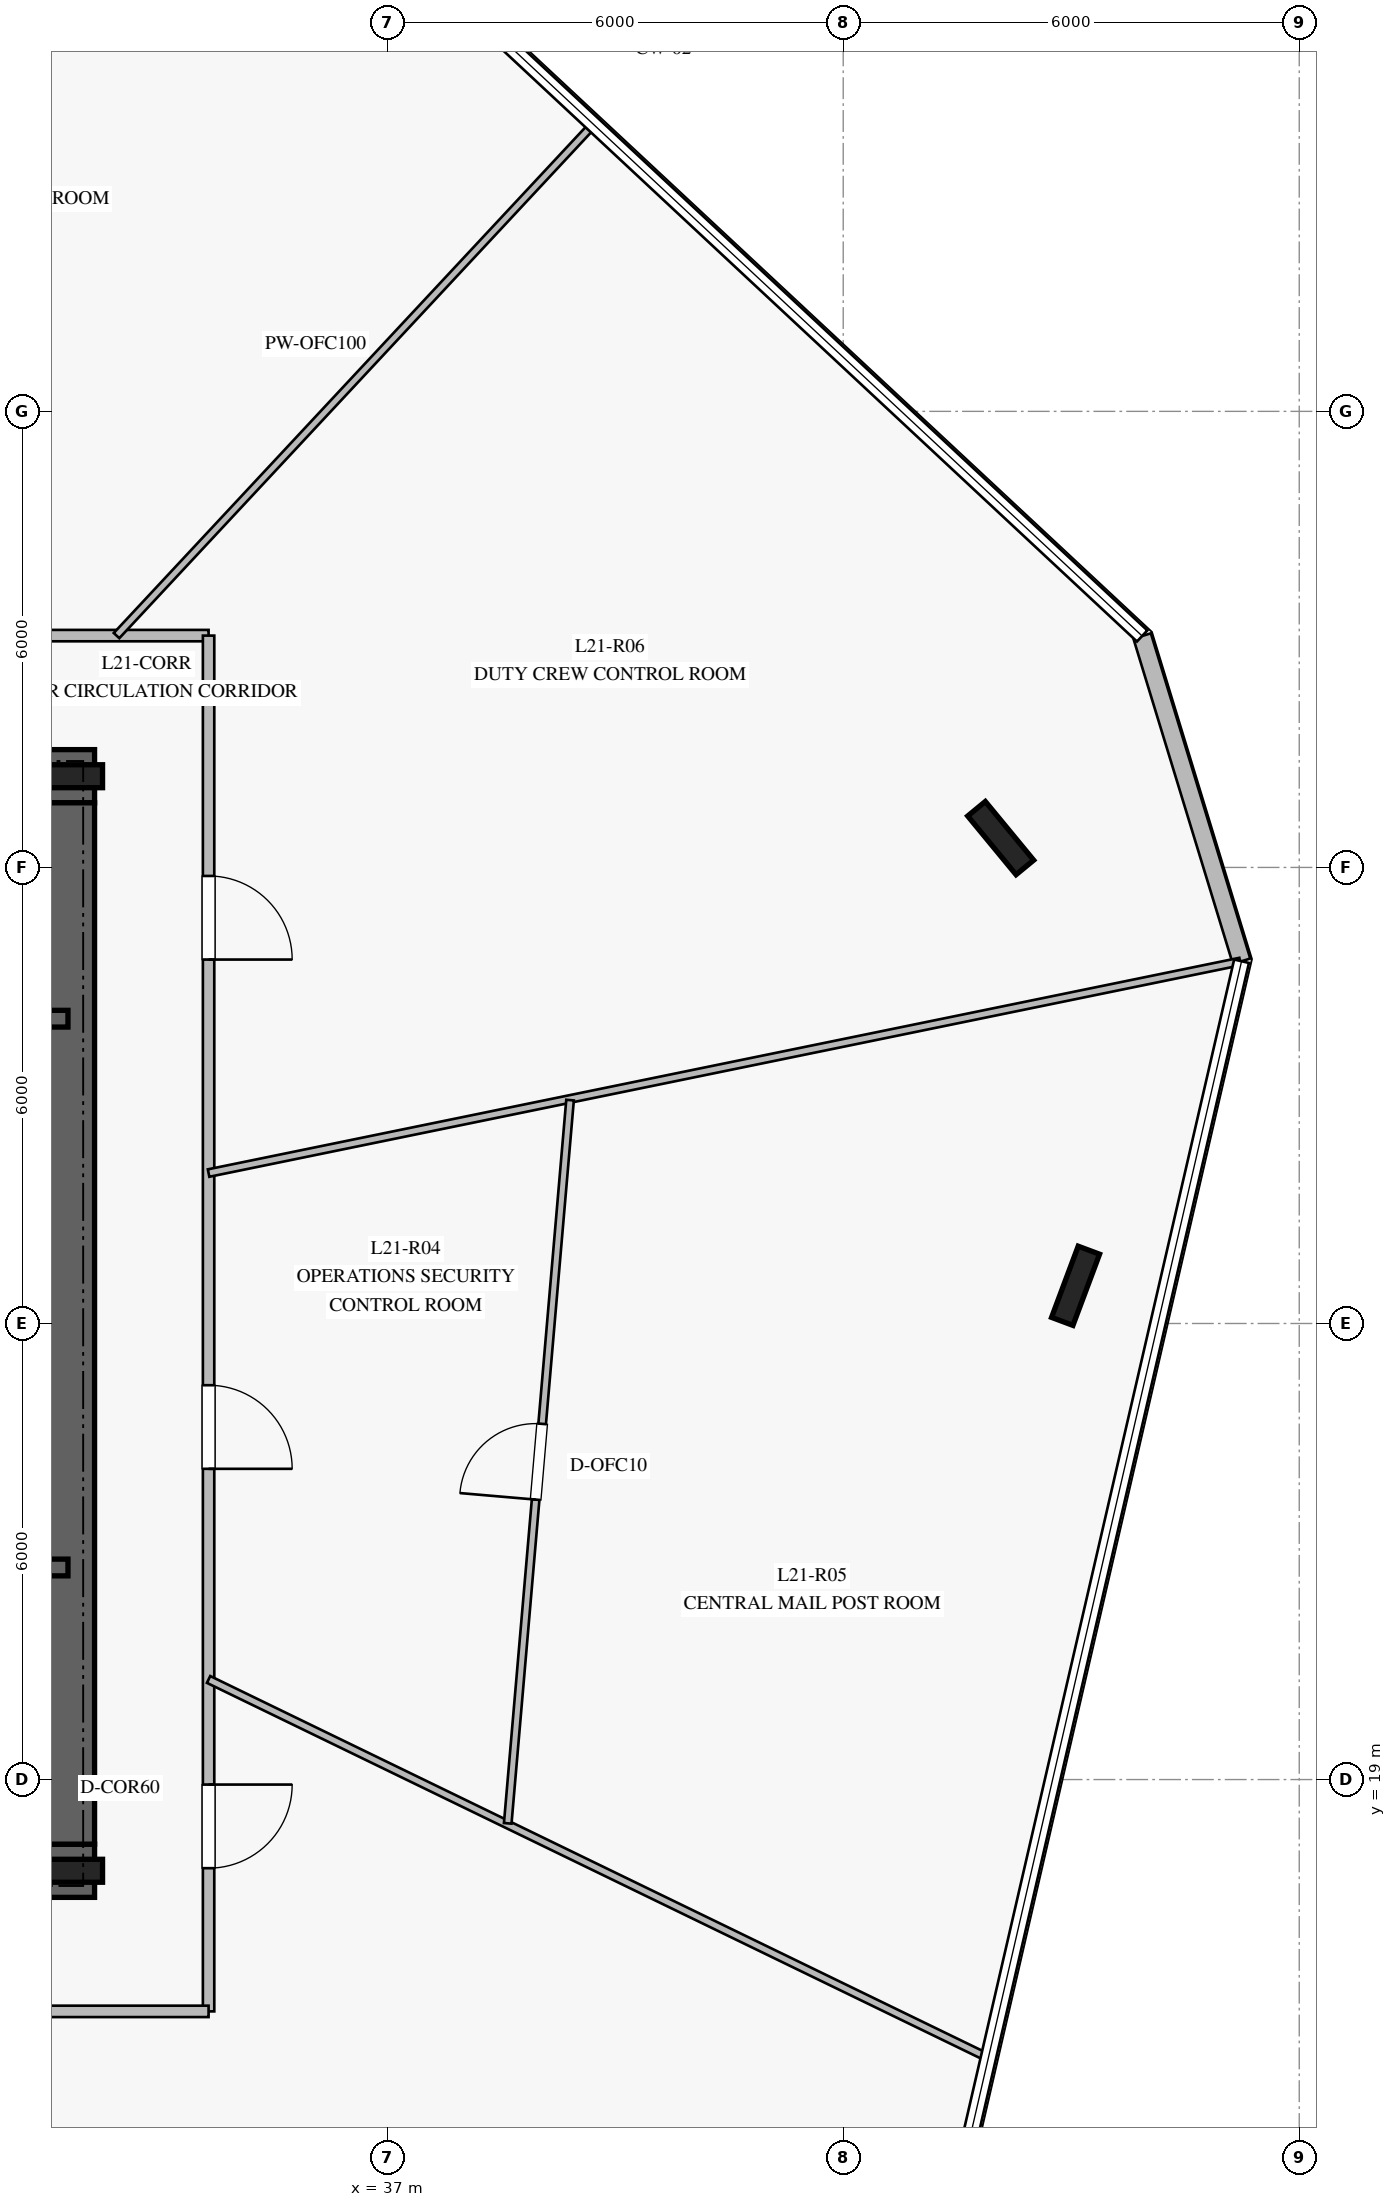
"""IFC4 building model, lengths in metres.
Left out: names, types, materials, properties, quantities, classifications, styles, units other than length and angle.
Written with IfcOpenShell. Run it as: python <this file> out.ifc"""

import sys

from ifc_helpers import new_model, si_unit, direction, frame, frame_2d, origin, origin_2d, place, context, subcontext, project, spatial, rectangle, i_section, extrude, element, fill, save


model = new_model("IFC4")
c1 = context("Model", 3, precision=1e-05, world=origin(), true_north=direction((0.0, 1.0)))
c2 = subcontext(c1, "Body", "Model", "MODEL_VIEW")
j1 = project(units=[si_unit("LENGTHUNIT", "METRE"), si_unit("PLANEANGLEUNIT", "RADIAN")], contexts=[c1])
p1 = place(None, origin())
s1 = spatial("IfcSite", under=j1, at=p1, CompositionType="ELEMENT")
p2 = place(p1, origin())
s2 = spatial("IfcBuilding", under=s1, at=p2, CompositionType="ELEMENT")
p3 = place(p2, frame((0.0, 0.0, 88.0)))
s3 = spatial("IfcBuildingStorey", under=s2, at=p3, CompositionType="ELEMENT", Elevation=88.0)
p4 = place(p3, frame((16.85, 17.8, 0.0), z_axis=(0.0, 0.0, 1.0), x_axis=(1.0, 0.0, 0.0)))
e1 = element("IfcWall", 1, at=p4, inside=s3, PredefinedType="SHEAR", context=c2, shape_type="SweptSolid", body=[
    extrude(rectangle(XDim=16.3, YDim=0.7, at=frame_2d((8.15, 0.0))), origin(), (0.0, 0.0, 1.0), 3.7),
])
p5 = place(p4, frame((5.1, 0.0, 0.0)))
e2 = element("IfcOpeningElement", 2, at=p5, cuts=e1, PredefinedType="OPENING", context=c2, shape_type="SweptSolid", body=[
    extrude(rectangle(XDim=1.2, YDim=2.25, at=frame_2d((0.6, 1.125))), frame((0.0, 0.36, 0.0), z_axis=(0.0, -1.0, 0.0), x_axis=(1.0, 0.0, 0.0)), (0.0, 0.0, 1.0), 0.72),
])
p6 = place(p4, frame((14.05, 0.0, 0.0)))
e3 = element("IfcOpeningElement", 3, at=p6, cuts=e1, PredefinedType="OPENING", context=c2, shape_type="SweptSolid", body=[
    extrude(rectangle(XDim=0.9, YDim=2.1, at=frame_2d((0.45, 1.05))), frame((0.0, 0.36, 0.0), z_axis=(0.0, -1.0, 0.0), x_axis=(1.0, 0.0, 0.0)), (0.0, 0.0, 1.0), 0.72),
])
p7 = place(p4, frame((7.95, 0.0, 0.0)))
e4 = element("IfcOpeningElement", 4, at=p7, cuts=e1, PredefinedType="OPENING", context=c2, shape_type="SweptSolid", body=[
    extrude(rectangle(XDim=1.1, YDim=2.2, at=frame_2d((0.55, 1.1))), frame((0.0, 0.36, 0.0), z_axis=(0.0, -1.0, 0.0), x_axis=(1.0, 0.0, 0.0)), (0.0, 0.0, 1.0), 0.72),
])
p8 = place(p4, frame((9.925, 0.0, 0.0)))
e5 = element("IfcOpeningElement", 5, at=p8, cuts=e1, PredefinedType="OPENING", context=c2, shape_type="SweptSolid", body=[
    extrude(rectangle(XDim=1.1, YDim=2.2, at=frame_2d((0.55, 1.1))), frame((0.0, 0.36, 0.0), z_axis=(0.0, -1.0, 0.0), x_axis=(1.0, 0.0, 0.0)), (0.0, 0.0, 1.0), 0.72),
])
p9 = place(p4, frame((11.9, 0.0, 0.0)))
e6 = element("IfcOpeningElement", 6, at=p9, cuts=e1, PredefinedType="OPENING", context=c2, shape_type="SweptSolid", body=[
    extrude(rectangle(XDim=1.1, YDim=2.2, at=frame_2d((0.55, 1.1))), frame((0.0, 0.36, 0.0), z_axis=(0.0, -1.0, 0.0), x_axis=(1.0, 0.0, 0.0)), (0.0, 0.0, 1.0), 0.72),
])
p10 = place(p3, frame((33.15, 32.2, 0.0), z_axis=(0.0, 0.0, 1.0), x_axis=(-1.0, 0.0, 0.0)))
e7 = element("IfcWall", 7, at=p10, inside=s3, PredefinedType="SHEAR", context=c2, shape_type="SweptSolid", body=[
    extrude(rectangle(XDim=16.3, YDim=0.7, at=frame_2d((8.15, 0.0))), origin(), (0.0, 0.0, 1.0), 3.7),
])
p11 = place(p10, frame((5.1, 0.0, 0.0)))
e8 = element("IfcOpeningElement", 8, at=p11, cuts=e7, PredefinedType="OPENING", context=c2, shape_type="SweptSolid", body=[
    extrude(rectangle(XDim=1.2, YDim=2.25, at=frame_2d((0.6, 1.125))), frame((0.0, 0.36, 0.0), z_axis=(0.0, -1.0, 0.0), x_axis=(1.0, 0.0, 0.0)), (0.0, 0.0, 1.0), 0.72),
])
p12 = place(p3, frame((32.8, 18.15, 0.0), z_axis=(0.0, 0.0, 1.0), x_axis=(0.0, 1.0, 0.0)))
e9 = element("IfcWall", 9, at=p12, inside=s3, PredefinedType="SHEAR", context=c2, shape_type="SweptSolid", body=[
    extrude(rectangle(XDim=13.7, YDim=0.7, at=frame_2d((6.85, 0.0))), origin(), (0.0, 0.0, 1.0), 3.7),
])
for number, where, z_axis, x_axis in (
    (10, (32.8, 17.8, 0.0), (0.0, 0.0, 1.0), (1.0, 0.0, 0.0)),
    (11, (32.8, 32.2, 0.0), (0.0, 0.0, 1.0), (1.0, 0.0, 0.0)),
):
    element("IfcColumn", number, at=place(p3, frame(where, z_axis=z_axis, x_axis=x_axis)), inside=s3, PredefinedType="COLUMN", context=c2, shape_type="SweptSolid", body=[
        extrude(i_section(OverallWidth=0.302, OverallDepth=0.91, WebThickness=0.021, FlangeThickness=0.04, at=origin_2d()), origin(), (0.0, 0.0, 1.0), 4.0),
    ])
for number, where, z_axis, x_axis in (
    (12, (29.08, 21.79, 0.0), (0.0, 0.0, 1.0), (1.0, 0.0, 0.0)),
    (13, (29.08, 29.01, 0.0), (0.0, 0.0, 1.0), (1.0, 0.0, 0.0)),
):
    element("IfcWall", number, at=place(p3, frame(where, z_axis=z_axis, x_axis=x_axis)), inside=s3, PredefinedType="SOLIDWALL", context=c2, shape_type="SweptSolid", body=[
        extrude(rectangle(XDim=3.72, YDim=0.22, at=frame_2d((1.86, 0.0))), origin(), (0.0, 0.0, 1.0), 3.7),
    ])
for number, where, z_axis, x_axis in (
    (14, (45.072, 31.386, 0.0), (0.0, 0.0, 1.0), (-0.636, 0.772, 0.0)),
    (15, (46.057, 25.496, 0.0), (0.0, 0.0, 1.0), (0.35, 0.937, 0.0)),
):
    element("IfcColumn", number, at=place(p3, frame(where, z_axis=z_axis, x_axis=x_axis)), inside=s3, PredefinedType="COLUMN", context=c2, shape_type="SweptSolid", body=[
        extrude(i_section(OverallWidth=0.3, OverallDepth=1.0, WebThickness=0.019, FlangeThickness=0.036, at=origin_2d()), origin(), (0.0, 0.0, 1.0), 4.0),
    ])
p13 = place(p3, frame((48.241, 29.766, 0.0), z_axis=(0.0, 0.0, 1.0), x_axis=(-0.292310029535, 0.956323609786, 0.0)))
e16 = element("IfcWall", 16, at=p13, inside=s3, PredefinedType="STANDARD", context=c2, shape_type="SweptSolid", body=[
    extrude(rectangle(XDim=4.474, YDim=0.24, at=frame_2d((2.237, 0.0))), origin(), (0.0, 0.0, 1.0), 3.7),
])
p14 = place(p3, frame((15.35, 34.05, 0.0), z_axis=(0.0, 0.0, 1.0), x_axis=(1.0, 0.0, 0.0)))
e17 = element("IfcWall", 17, at=p14, inside=s3, PredefinedType="PARTITIONING", context=c2, shape_type="SweptSolid", body=[
    extrude(rectangle(XDim=19.3, YDim=0.15, at=frame_2d((9.65, 0.0))), origin(), (0.0, 0.0, 1.0), 3.15),
])
p15 = place(p14, frame((13.036, 0.0, 0.0)))
e18 = element("IfcOpeningElement", 18, at=p15, cuts=e17, PredefinedType="OPENING", context=c2, shape_type="SweptSolid", body=[
    extrude(rectangle(XDim=1.1, YDim=2.2, at=frame_2d((0.55, 1.1))), frame((0.0, 0.085, 0.0), z_axis=(0.0, -1.0, 0.0), x_axis=(1.0, 0.0, 0.0)), (0.0, 0.0, 1.0), 0.17),
])
p16 = place(p14, frame((4.716, 0.0, 0.0)))
e19 = element("IfcOpeningElement", 19, at=p16, cuts=e17, PredefinedType="OPENING", context=c2, shape_type="SweptSolid", body=[
    extrude(rectangle(XDim=1.1, YDim=2.2, at=frame_2d((0.55, 1.1))), frame((0.0, 0.085, 0.0), z_axis=(0.0, -1.0, 0.0), x_axis=(1.0, 0.0, 0.0)), (0.0, 0.0, 1.0), 0.17),
])
p17 = place(p3, frame((34.65, 34.05, 0.0), z_axis=(0.0, 0.0, 1.0), x_axis=(0.0, -1.0, 0.0)))
e20 = element("IfcWall", 20, at=p17, inside=s3, PredefinedType="PARTITIONING", context=c2, shape_type="SweptSolid", body=[
    extrude(rectangle(XDim=18.1, YDim=0.15, at=frame_2d((9.05, 0.0))), origin(), (0.0, 0.0, 1.0), 3.15),
])
p18 = place(p17, frame((15.116, 0.0, 0.0)))
e21 = element("IfcOpeningElement", 21, at=p18, cuts=e20, PredefinedType="OPENING", context=c2, shape_type="SweptSolid", body=[
    extrude(rectangle(XDim=1.1, YDim=2.2, at=frame_2d((0.55, 1.1))), frame((0.0, 0.085, 0.0), z_axis=(0.0, -1.0, 0.0), x_axis=(1.0, 0.0, 0.0)), (0.0, 0.0, 1.0), 0.17),
])
p19 = place(p17, frame((9.862, 0.0, 0.0)))
e22 = element("IfcOpeningElement", 22, at=p19, cuts=e20, PredefinedType="OPENING", context=c2, shape_type="SweptSolid", body=[
    extrude(rectangle(XDim=1.1, YDim=2.2, at=frame_2d((0.55, 1.1))), frame((0.0, 0.085, 0.0), z_axis=(0.0, -1.0, 0.0), x_axis=(1.0, 0.0, 0.0)), (0.0, 0.0, 1.0), 0.17),
])
p20 = place(p17, frame((3.162, 0.0, 0.0)))
e23 = element("IfcOpeningElement", 23, at=p20, cuts=e20, PredefinedType="OPENING", context=c2, shape_type="SweptSolid", body=[
    extrude(rectangle(XDim=1.1, YDim=2.2, at=frame_2d((0.55, 1.1))), frame((0.0, 0.085, 0.0), z_axis=(0.0, -1.0, 0.0), x_axis=(1.0, 0.0, 0.0)), (0.0, 0.0, 1.0), 0.17),
])
p21 = place(p3, frame((34.65, 15.95, 0.0), z_axis=(0.0, 0.0, 1.0), x_axis=(-1.0, 0.0, 0.0)))
e24 = element("IfcWall", 24, at=p21, inside=s3, PredefinedType="PARTITIONING", context=c2, shape_type="SweptSolid", body=[
    extrude(rectangle(XDim=19.3, YDim=0.15, at=frame_2d((9.65, 0.0))), origin(), (0.0, 0.0, 1.0), 3.15),
])
p22 = place(p21, frame((12.608, 0.0, 0.0)))
e25 = element("IfcOpeningElement", 25, at=p22, cuts=e24, PredefinedType="OPENING", context=c2, shape_type="SweptSolid", body=[
    extrude(rectangle(XDim=1.1, YDim=2.2, at=frame_2d((0.55, 1.1))), frame((0.0, 0.085, 0.0), z_axis=(0.0, -1.0, 0.0), x_axis=(1.0, 0.0, 0.0)), (0.0, 0.0, 1.0), 0.17),
])
p23 = place(p3, frame((33.439, 34.05, 0.0), z_axis=(0.0, 0.0, 1.0), x_axis=(0.682067130349, 0.731289566244, 0.0)))
e26 = element("IfcWall", 26, at=p23, inside=s3, PredefinedType="MOVABLE", context=c2, shape_type="SweptSolid", body=[
    extrude(rectangle(XDim=9.181, YDim=0.1, at=frame_2d((4.59, 0.0))), origin(), (0.0, 0.0, 1.0), 3.0),
])
p24 = place(p3, frame((34.65, 20.317, 0.0), z_axis=(0.0, 0.0, 1.0), x_axis=(0.89965666283, -0.436598086374, 0.0)))
e27 = element("IfcWall", 27, at=p24, inside=s3, PredefinedType="MOVABLE", context=c2, shape_type="SweptSolid", body=[
    extrude(rectangle(XDim=11.386, YDim=0.1, at=frame_2d((5.693, 0.0))), origin(), (0.0, 0.0, 1.0), 3.0),
])
p25 = place(p3, frame((34.65, 26.979, 0.0), z_axis=(0.0, 0.0, 1.0), x_axis=(0.979617551481, 0.200871732283, 0.0)))
e28 = element("IfcWall", 28, at=p25, inside=s3, PredefinedType="MOVABLE", context=c2, shape_type="SweptSolid", body=[
    extrude(rectangle(XDim=13.854, YDim=0.1, at=frame_2d((6.927, 0.0))), origin(), (0.0, 0.0, 1.0), 3.0),
])
p26 = place(p3, frame((38.586, 18.424, 0.0), z_axis=(0.0, 0.0, 1.0), x_axis=(0.085869529315, 0.996306390592, 0.0)))
e29 = element("IfcWall", 29, at=p26, inside=s3, PredefinedType="MOVABLE", context=c2, shape_type="SweptSolid", body=[
    extrude(rectangle(XDim=9.55, YDim=0.1, at=frame_2d((4.775, 0.0))), origin(), (0.0, 0.0, 1.0), 3.7),
])
p27 = place(p26, frame((4.275, 0.0, 0.0)))
e30 = element("IfcOpeningElement", 30, at=p27, cuts=e29, PredefinedType="OPENING", context=c2, shape_type="SweptSolid", body=[
    extrude(rectangle(XDim=1.0, YDim=2.15, at=frame_2d((0.5, 1.075))), frame((0.0, 0.06, 0.0), z_axis=(0.0, -1.0, 0.0), x_axis=(1.0, 0.0, 0.0)), (0.0, 0.0, 1.0), 0.12),
])
p28 = place(p18, origin())
e31 = element("IfcDoor", 31, at=p28, inside=s3, OperationType="SINGLE_SWING_LEFT", PredefinedType="DOOR", context=c2, shape_type="SweptSolid", body=[
    extrude(rectangle(XDim=1.1, YDim=2.2, at=frame_2d((0.55, 1.1))), frame((0.0, 0.025, 0.0), z_axis=(0.0, -1.0, 0.0), x_axis=(1.0, 0.0, 0.0)), (0.0, 0.0, 1.0), 0.05),
])
fill(e21, e31)
p29 = place(p19, origin())
e32 = element("IfcDoor", 32, at=p29, inside=s3, OperationType="SINGLE_SWING_RIGHT", PredefinedType="DOOR", context=c2, shape_type="SweptSolid", body=[
    extrude(rectangle(XDim=1.1, YDim=2.2, at=frame_2d((0.55, 1.1))), frame((0.0, 0.025, 0.0), z_axis=(0.0, -1.0, 0.0), x_axis=(1.0, 0.0, 0.0)), (0.0, 0.0, 1.0), 0.05),
])
fill(e22, e32)
p30 = place(p27, origin())
e33 = element("IfcDoor", 33, at=p30, inside=s3, OperationType="SINGLE_SWING_LEFT", PredefinedType="DOOR", context=c2, shape_type="SweptSolid", body=[
    extrude(rectangle(XDim=1.0, YDim=2.15, at=frame_2d((0.5, 1.075))), frame((0.0, 0.025, 0.0), z_axis=(0.0, -1.0, 0.0), x_axis=(1.0, 0.0, 0.0)), (0.0, 0.0, 1.0), 0.05),
])
fill(e30, e33)
p31 = place(p20, origin())
e34 = element("IfcDoor", 34, at=p31, inside=s3, OperationType="SINGLE_SWING_RIGHT", PredefinedType="DOOR", context=c2, shape_type="SweptSolid", body=[
    extrude(rectangle(XDim=1.1, YDim=2.2, at=frame_2d((0.55, 1.1))), frame((0.0, 0.025, 0.0), z_axis=(0.0, -1.0, 0.0), x_axis=(1.0, 0.0, 0.0)), (0.0, 0.0, 1.0), 0.05),
])
fill(e23, e34)
save(model, sys.argv[1])
